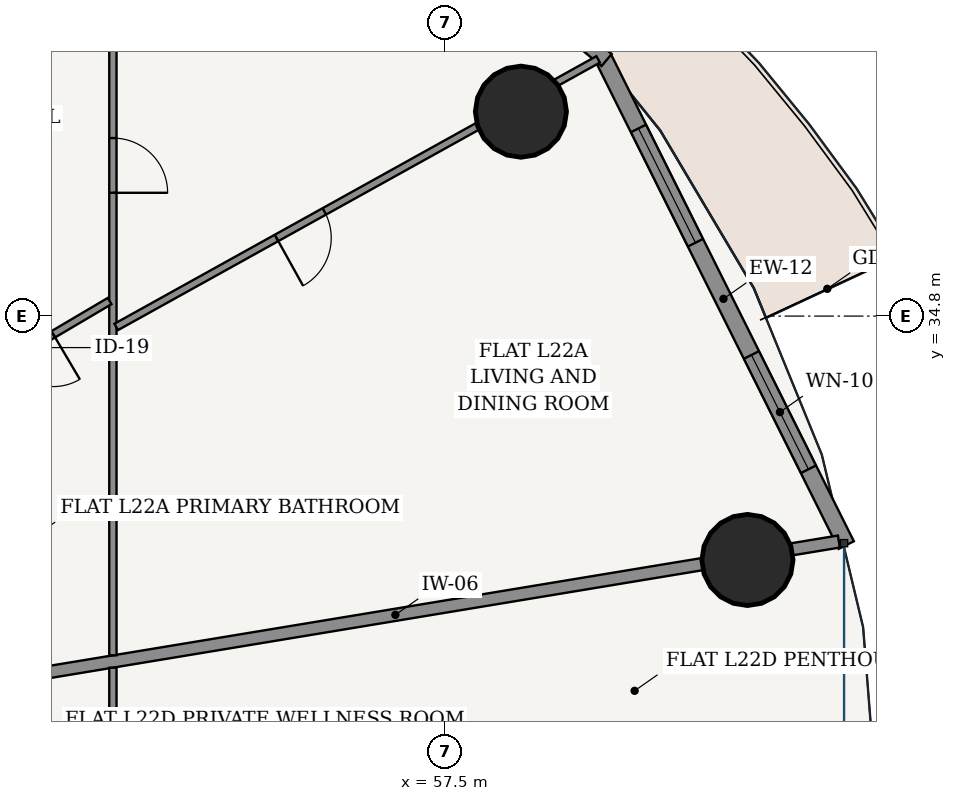
"""IFC4 building model, lengths in metres.
Left out: names, types, materials, properties, quantities, classifications, styles, units other than length and angle.
Written with IfcOpenShell. Run it as: python <this file> out.ifc"""

import sys

from ifc_helpers import new_model, si_unit, direction, frame, frame_2d, origin, origin_2d, place, context, subcontext, project, spatial, rectangle, hollow_circle, extrude, source, transform, mapped, element, fill, save


model = new_model("IFC4")
c1 = context("Model", 3, precision=1e-05, world=origin(), true_north=direction((-0.2419218956, 0.970295726276)))
c2 = subcontext(c1, "Body", "Model", "MODEL_VIEW")
j1 = project(units=[si_unit("LENGTHUNIT", "METRE"), si_unit("PLANEANGLEUNIT", "RADIAN")], contexts=[c1])
p1 = place(None, origin())
s1 = spatial("IfcSite", under=j1, at=p1, CompositionType="ELEMENT")
p2 = place(p1, origin())
s2 = spatial("IfcBuilding", under=s1, at=p2, CompositionType="ELEMENT")
p3 = place(p2, frame((0.0, 0.0, 87.0)))
s3 = spatial("IfcBuildingStorey", under=s2, at=p3, CompositionType="ELEMENT", Elevation=87.0)
for number, where, z_axis, x_axis in (
    (1, (62.471, 30.79, 0.0), (0.0, 0.0, 1.0), (1.0, 0.0, 0.0)),
    (2, (58.745, 38.161, 0.0), (0.0, 0.0, 1.0), (1.0, 0.0, 0.0)),
):
    element("IfcColumn", number, at=place(p3, frame(where, z_axis=z_axis, x_axis=x_axis)), inside=s3, PredefinedType="COLUMN", context=c2, shape_type="SweptSolid", body=[
        extrude(hollow_circle(Radius=0.75, WallThickness=0.045, at=origin_2d()), origin(), (0.0, 0.0, 1.0), 3.6),
    ])
p4 = place(p3, frame((64.095, 31.034, 0.0), z_axis=(0.0, 0.0, 1.0), x_axis=(-0.446263788661, 0.894901464369, 0.0)))
e3 = element("IfcWall", 3, at=p4, inside=s3, PredefinedType="SOLIDWALL", context=c2, shape_type="SweptSolid", body=[
    extrude(rectangle(XDim=9.05, YDim=0.28, at=frame_2d((4.525, 0.0))), origin(), (0.0, 0.0, 1.0), 3.325),
])
p5 = place(p4, frame((1.394, 0.0, 0.85)))
e4 = element("IfcOpeningElement", 4, at=p5, cuts=e3, PredefinedType="OPENING", context=c2, shape_type="SweptSolid", body=[
    extrude(rectangle(XDim=2.1, YDim=1.95, at=frame_2d((1.05, 0.975))), frame((0.0, 0.15, 0.0), z_axis=(0.0, -1.0, 0.0), x_axis=(1.0, 0.0, 0.0)), (0.0, 0.0, 1.0), 0.3),
])
p6 = place(p4, frame((5.557, 0.0, 0.85)))
e5 = element("IfcOpeningElement", 5, at=p6, cuts=e3, PredefinedType="OPENING", context=c2, shape_type="SweptSolid", body=[
    extrude(rectangle(XDim=2.1, YDim=1.95, at=frame_2d((1.05, 0.975))), frame((0.0, 0.15, 0.0), z_axis=(0.0, -1.0, 0.0), x_axis=(1.0, 0.0, 0.0)), (0.0, 0.0, 1.0), 0.3),
])
p7 = place(p3, frame((60.154, 39.01, 0.0), z_axis=(0.0, 0.0, 1.0), x_axis=(-0.769242574941, 0.638956853706, 0.0)))
e6 = element("IfcWall", 6, at=p7, inside=s3, PredefinedType="SOLIDWALL", context=c2, shape_type="SweptSolid", body=[
    extrude(rectangle(XDim=9.69, YDim=0.26, at=frame_2d((4.845, 0.0))), origin(), (0.0, 0.0, 1.0), 3.325),
])
p8 = place(p7, frame((4.17, 0.0, 0.0)))
e7 = element("IfcOpeningElement", 7, at=p8, cuts=e6, PredefinedType="OPENING", context=c2, shape_type="SweptSolid", body=[
    extrude(rectangle(XDim=1.35, YDim=2.2, at=frame_2d((0.675, 1.1))), frame((0.0, 0.14, 0.0), z_axis=(0.0, -1.0, 0.0), x_axis=(1.0, 0.0, 0.0)), (0.0, 0.0, 1.0), 0.28),
])
p9 = place(p3, frame((49.387, 28.682, 0.0), z_axis=(0.0, 0.0, 1.0), x_axis=(0.986617934215, 0.163049231479, 0.0)))
e8 = element("IfcWall", 8, at=p9, inside=s3, PredefinedType="PARTITIONING", context=c2, shape_type="SweptSolid", body=[
    extrude(rectangle(XDim=14.785, YDim=0.2, at=frame_2d((7.392, 0.0))), origin(), (0.0, 0.0, 1.0), 2.767),
])
p10 = place(p3, frame((52.035, 39.835, 0.0), z_axis=(0.0, 0.0, 1.0), x_axis=(0.0, -1.0, 0.0)))
e9 = element("IfcWall", 9, at=p10, inside=s3, PredefinedType="PARTITIONING", context=c2, shape_type="SweptSolid", body=[
    extrude(rectangle(XDim=10.614, YDim=0.12, at=frame_2d((5.307, 0.0))), origin(), (0.0, 0.0, 1.0), 2.767),
])
p11 = place(p10, frame((2.107, 0.0, 0.0)))
e10 = element("IfcOpeningElement", 10, at=p11, cuts=e9, PredefinedType="OPENING", context=c2, shape_type="SweptSolid", body=[
    extrude(rectangle(XDim=0.9, YDim=2.15, at=frame_2d((0.45, 1.075))), frame((0.0, 0.07, 0.0), z_axis=(0.0, -1.0, 0.0), x_axis=(1.0, 0.0, 0.0)), (0.0, 0.0, 1.0), 0.14),
])
p12 = place(p3, frame((52.089, 34.622, 0.0), z_axis=(0.0, 0.0, 1.0), x_axis=(0.874324904351, 0.485341077626, 0.0)))
e11 = element("IfcWall", 11, at=p12, inside=s3, PredefinedType="PARTITIONING", context=c2, shape_type="SweptSolid", body=[
    extrude(rectangle(XDim=9.066, YDim=0.12, at=frame_2d((4.533, 0.0))), origin(), (0.0, 0.0, 1.0), 2.767),
])
p13 = place(p12, frame((3.016, 0.0, 0.0)))
e12 = element("IfcOpeningElement", 12, at=p13, cuts=e11, PredefinedType="OPENING", context=c2, shape_type="SweptSolid", body=[
    extrude(rectangle(XDim=0.9, YDim=2.15, at=frame_2d((0.45, 1.075))), frame((0.0, 0.07, 0.0), z_axis=(0.0, -1.0, 0.0), x_axis=(1.0, 0.0, 0.0)), (0.0, 0.0, 1.0), 0.14),
])
p14 = place(p3, frame((49.387, 33.517, 0.0), z_axis=(0.0, 0.0, 1.0), x_axis=(0.861344081849, 0.508022019862, 0.0)))
e13 = element("IfcWall", 13, at=p14, inside=s3, PredefinedType="PARTITIONING", context=c2, shape_type="SweptSolid", body=[
    extrude(rectangle(XDim=3.013, YDim=0.12, at=frame_2d((1.506, 0.0))), origin(), (0.0, 0.0, 1.0), 3.325),
])
p15 = place(p14, frame((1.076, 0.0, 0.0)))
e14 = element("IfcOpeningElement", 14, at=p15, cuts=e13, PredefinedType="OPENING", context=c2, shape_type="SweptSolid", body=[
    extrude(rectangle(XDim=0.86, YDim=2.15, at=frame_2d((0.43, 1.075))), frame((0.0, 0.07, 0.0), z_axis=(0.0, -1.0, 0.0), x_axis=(1.0, 0.0, 0.0)), (0.0, 0.0, 1.0), 0.14),
])
p16 = place(p3, frame((52.035, 29.017, 0.0), z_axis=(0.0, 0.0, 1.0), x_axis=(0.0, -1.0, 0.0)))
e15 = element("IfcWall", 15, at=p16, inside=s3, PredefinedType="PARTITIONING", context=c2, shape_type="SweptSolid", body=[
    extrude(rectangle(XDim=15.252, YDim=0.12, at=frame_2d((7.626, 0.0))), origin(), (0.0, 0.0, 1.0), 2.767),
])
p17 = place(p16, frame((7.278, 0.0, 0.0)))
e16 = element("IfcOpeningElement", 16, at=p17, cuts=e15, PredefinedType="OPENING", context=c2, shape_type="SweptSolid", body=[
    extrude(rectangle(XDim=0.9, YDim=2.15, at=frame_2d((0.45, 1.075))), frame((0.0, 0.07, 0.0), z_axis=(0.0, -1.0, 0.0), x_axis=(1.0, 0.0, 0.0)), (0.0, 0.0, 1.0), 0.14),
])
m1 = source(origin(), c2, "Body", "SweptSolid", [
    extrude(rectangle(XDim=2.1, YDim=1.95, at=frame_2d((1.05, 0.975))), frame((0.0, 0.03, 0.0), z_axis=(0.0, -1.0, 0.0), x_axis=(1.0, 0.0, 0.0)), (0.0, 0.0, 1.0), 0.06),
])
p18 = place(p5, origin())
e17 = element("IfcWindow", 17, at=p18, inside=s3, PartitioningType="SINGLE_PANEL", PredefinedType="WINDOW", context=c2, shape_type="MappedRepresentation", body=[
    mapped(m1, transform((0.0, 0.0, 0.0), scale=1.0)),
])
fill(e4, e17)
p19 = place(p6, origin())
e18 = element("IfcWindow", 18, at=p19, inside=s3, PartitioningType="SINGLE_PANEL", PredefinedType="WINDOW", context=c2, shape_type="MappedRepresentation", body=[
    mapped(m1, transform((0.0, 0.0, 0.0), scale=1.0)),
])
fill(e5, e18)
m2 = source(origin(), c2, "Body", "SweptSolid", [
    extrude(rectangle(XDim=0.86, YDim=2.15, at=frame_2d((0.43, 1.075))), frame((0.0, 0.025, 0.0), z_axis=(0.0, -1.0, 0.0), x_axis=(1.0, 0.0, 0.0)), (0.0, 0.0, 1.0), 0.05),
])
p20 = place(p15, frame((0.86, 0.0, 0.0), z_axis=(0.0, 0.0, 1.0), x_axis=(-1.0, 0.0, 0.0)))
e19 = element("IfcDoor", 19, at=p20, inside=s3, OperationType="SINGLE_SWING_LEFT", PredefinedType="DOOR", context=c2, shape_type="MappedRepresentation", body=[
    mapped(m2, transform((0.0, 0.0, 0.0), scale=1.0)),
])
fill(e14, e19)
m3 = source(origin(), c2, "Body", "SweptSolid", [
    extrude(rectangle(XDim=0.9, YDim=2.15, at=frame_2d((0.45, 1.075))), frame((0.0, 0.025, 0.0), z_axis=(0.0, -1.0, 0.0), x_axis=(1.0, 0.0, 0.0)), (0.0, 0.0, 1.0), 0.05),
])
p21 = place(p11, origin())
e20 = element("IfcDoor", 20, at=p21, inside=s3, OperationType="SINGLE_SWING_RIGHT", PredefinedType="DOOR", context=c2, shape_type="MappedRepresentation", body=[
    mapped(m3, transform((0.0, 0.0, 0.0), scale=1.0)),
])
fill(e10, e20)
p22 = place(p13, frame((0.9, 0.0, 0.0), z_axis=(0.0, 0.0, 1.0), x_axis=(-1.0, 0.0, 0.0)))
e21 = element("IfcDoor", 21, at=p22, inside=s3, OperationType="SINGLE_SWING_RIGHT", PredefinedType="DOOR", context=c2, shape_type="MappedRepresentation", body=[
    mapped(m3, transform((0.0, 0.0, 0.0), scale=1.0)),
])
fill(e12, e21)
save(model, sys.argv[1])
